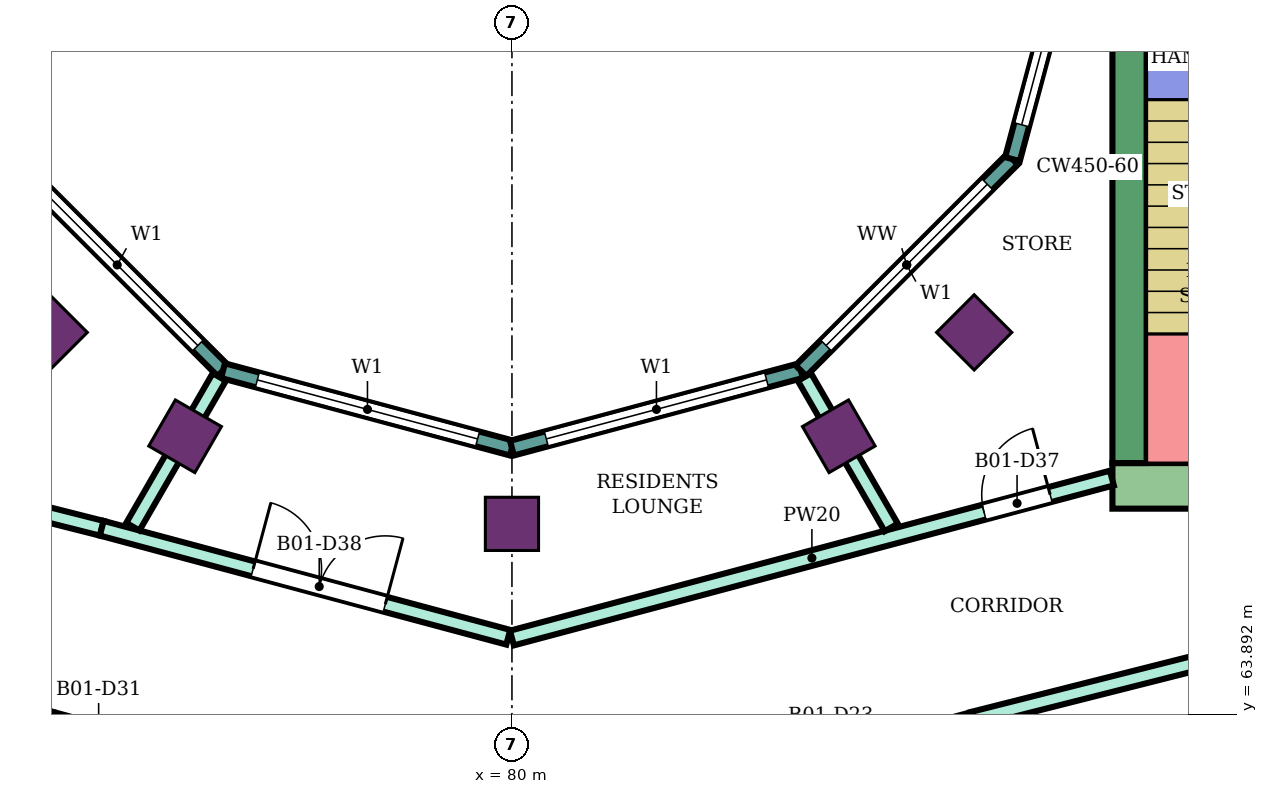
"""IFC4 building model, lengths in metres.
Left out: names, types, materials, properties, quantities, classifications, styles, units other than length and angle.
Written with IfcOpenShell. Run it as: python <this file> out.ifc"""

import sys

from ifc_helpers import new_model, si_unit, direction, frame, frame_2d, origin, origin_2d, place, context, subcontext, project, spatial, rectangle, extrude, element, fill, save


model = new_model("IFC4")
c1 = context("Model", 3, precision=1e-05, world=origin(), true_north=direction((0.0, 1.0)))
c2 = subcontext(c1, "Body", "Model", "MODEL_VIEW")
j1 = project(units=[si_unit("LENGTHUNIT", "METRE"), si_unit("PLANEANGLEUNIT", "RADIAN")], contexts=[c1])
p1 = place(None, origin())
s1 = spatial("IfcSite", under=j1, at=p1, CompositionType="ELEMENT")
p2 = place(p1, origin())
s2 = spatial("IfcBuilding", under=s1, at=p2, CompositionType="ELEMENT")
p3 = place(p2, frame((0.0, 0.0, 216.7)))
s3 = spatial("IfcBuildingStorey", under=s2, at=p3, CompositionType="ELEMENT", Elevation=216.7)
for number, where, z_axis, x_axis in (
    (1, (73.919, 68.919, 0.0), (0.0, 0.0, 1.0), (-0.707, -0.707, 0.0)),
    (2, (75.7, 67.552, 0.0), (0.0, 0.0, 1.0), (-0.5, -0.866, 0.0)),
    (3, (80.0, 66.4, 0.0), (0.0, 0.0, 1.0), (0.0, -1.0, 0.0)),
    (4, (84.3, 67.552, 0.0), (0.0, 0.0, 1.0), (0.5, -0.866, 0.0)),
    (5, (86.081, 68.919, 0.0), (0.0, 0.0, 1.0), (0.707, -0.707, 0.0)),
):
    element("IfcColumn", number, at=place(p3, frame(where, z_axis=z_axis, x_axis=x_axis)), inside=s3, PredefinedType="COLUMN", context=c2, shape_type="SweptSolid", body=[
        extrude(rectangle(XDim=0.7, YDim=0.7, at=origin_2d()), origin(), (0.0, 0.0, 1.0), 4.2),
    ])
p4 = place(p3, frame((87.9, 66.9, 0.0), z_axis=(0.0, 0.0, 1.0), x_axis=(1.0, 0.0, 0.0)))
e6 = element("IfcWall", 6, at=p4, inside=s3, PredefinedType="SHEAR", context=c2, shape_type="SweptSolid", body=[
    extrude(rectangle(XDim=14.9, YDim=0.6, at=frame_2d((7.45, 0.0))), origin(), (0.0, 0.0, 1.0), 3.88),
])
p5 = place(p4, frame((4.2, 0.0, 0.0)))
e7 = element("IfcOpeningElement", 7, at=p5, cuts=e6, PredefinedType="OPENING", context=c2, shape_type="SweptSolid", body=[
    extrude(rectangle(XDim=2.4, YDim=2.4, at=frame_2d((1.2, 1.2))), frame((0.0, 0.31, 0.0), z_axis=(0.0, -1.0, 0.0), x_axis=(1.0, 0.0, 0.0)), (0.0, 0.0, 1.0), 0.62),
])
p6 = place(p3, frame((88.125, 67.2, 0.0), z_axis=(0.0, 0.0, 1.0), x_axis=(0.0, 1.0, 0.0)))
e8 = element("IfcWall", 8, at=p6, inside=s3, PredefinedType="SHEAR", context=c2, shape_type="SweptSolid", body=[
    extrude(rectangle(XDim=7.8, YDim=0.45, at=frame_2d((3.9, 0.0))), origin(), (0.0, 0.0, 1.0), 3.88),
])
p7 = place(p3, frame((73.415, 71.198, 0.0), z_axis=(0.0, 0.0, 1.0), x_axis=(0.707106781187, -0.707106781187, 0.0)))
e9 = element("IfcWall", 9, at=p7, inside=s3, PredefinedType="NOTDEFINED", context=c2, shape_type="SweptSolid", body=[
    extrude(rectangle(XDim=3.936, YDim=0.2, at=frame_2d((1.968, 0.0))), origin(), (0.0, 0.0, 1.0), 4.2),
])
p8 = place(p7, frame((0.468, 0.0, 0.9)))
e10 = element("IfcOpeningElement", 10, at=p8, cuts=e9, PredefinedType="OPENING", context=c2, shape_type="SweptSolid", body=[
    extrude(rectangle(XDim=3.0, YDim=2.3, at=frame_2d((1.5, 1.15))), frame((0.0, 0.11, 0.0), z_axis=(0.0, -1.0, 0.0), x_axis=(1.0, 0.0, 0.0)), (0.0, 0.0, 1.0), 0.22),
])
p9 = place(p3, frame((76.198, 68.415, 0.0), z_axis=(0.0, 0.0, 1.0), x_axis=(0.965933654434, -0.258789828301, 0.0)))
e11 = element("IfcWall", 11, at=p9, inside=s3, PredefinedType="NOTDEFINED", context=c2, shape_type="SweptSolid", body=[
    extrude(rectangle(XDim=3.936, YDim=0.2, at=frame_2d((1.968, 0.0))), origin(), (0.0, 0.0, 1.0), 4.2),
])
p10 = place(p9, frame((0.468, 0.0, 0.9)))
e12 = element("IfcOpeningElement", 12, at=p10, cuts=e11, PredefinedType="OPENING", context=c2, shape_type="SweptSolid", body=[
    extrude(rectangle(XDim=3.0, YDim=2.3, at=frame_2d((1.5, 1.15))), frame((0.0, 0.11, 0.0), z_axis=(0.0, -1.0, 0.0), x_axis=(1.0, 0.0, 0.0)), (0.0, 0.0, 1.0), 0.22),
])
p11 = place(p3, frame((80.0, 67.396, 0.0), z_axis=(0.0, 0.0, 1.0), x_axis=(0.965933654434, 0.258789828301, 0.0)))
e13 = element("IfcWall", 13, at=p11, inside=s3, PredefinedType="NOTDEFINED", context=c2, shape_type="SweptSolid", body=[
    extrude(rectangle(XDim=3.936, YDim=0.2, at=frame_2d((1.968, 0.0))), origin(), (0.0, 0.0, 1.0), 4.2),
])
p12 = place(p11, frame((0.468, 0.0, 0.9)))
e14 = element("IfcOpeningElement", 14, at=p12, cuts=e13, PredefinedType="OPENING", context=c2, shape_type="SweptSolid", body=[
    extrude(rectangle(XDim=3.0, YDim=2.3, at=frame_2d((1.5, 1.15))), frame((0.0, 0.11, 0.0), z_axis=(0.0, -1.0, 0.0), x_axis=(1.0, 0.0, 0.0)), (0.0, 0.0, 1.0), 0.22),
])
p13 = place(p3, frame((83.802, 68.415, 0.0), z_axis=(0.0, 0.0, 1.0), x_axis=(0.707106781187, 0.707106781187, 0.0)))
e15 = element("IfcWall", 15, at=p13, inside=s3, PredefinedType="NOTDEFINED", context=c2, shape_type="SweptSolid", body=[
    extrude(rectangle(XDim=3.936, YDim=0.2, at=frame_2d((1.968, 0.0))), origin(), (0.0, 0.0, 1.0), 4.2),
])
p14 = place(p13, frame((0.468, 0.0, 0.9)))
e16 = element("IfcOpeningElement", 16, at=p14, cuts=e15, PredefinedType="OPENING", context=c2, shape_type="SweptSolid", body=[
    extrude(rectangle(XDim=3.0, YDim=2.3, at=frame_2d((1.5, 1.15))), frame((0.0, 0.11, 0.0), z_axis=(0.0, -1.0, 0.0), x_axis=(1.0, 0.0, 0.0)), (0.0, 0.0, 1.0), 0.22),
])
p15 = place(p3, frame((86.585, 71.198, 0.0), z_axis=(0.0, 0.0, 1.0), x_axis=(0.258789828301, 0.965933654434, 0.0)))
e17 = element("IfcWall", 17, at=p15, inside=s3, PredefinedType="NOTDEFINED", context=c2, shape_type="SweptSolid", body=[
    extrude(rectangle(XDim=3.936, YDim=0.2, at=frame_2d((1.968, 0.0))), origin(), (0.0, 0.0, 1.0), 4.2),
])
p16 = place(p15, frame((0.468, 0.0, 0.9)))
e18 = element("IfcOpeningElement", 18, at=p16, cuts=e17, PredefinedType="OPENING", context=c2, shape_type="SweptSolid", body=[
    extrude(rectangle(XDim=3.0, YDim=2.3, at=frame_2d((1.5, 1.15))), frame((0.0, 0.11, 0.0), z_axis=(0.0, -1.0, 0.0), x_axis=(1.0, 0.0, 0.0)), (0.0, 0.0, 1.0), 0.22),
])
p17 = place(p3, frame((69.86, 64.86, 0.0), z_axis=(0.0, 0.0, 1.0), x_axis=(0.96942980222, -0.245368821506, 0.0)))
e19 = element("IfcWall", 19, at=p17, inside=s3, PredefinedType="PARTITIONING", context=c2, shape_type="SweptSolid", body=[
    extrude(rectangle(XDim=4.216, YDim=0.2, at=frame_2d((2.108, 0.0))), origin(), (0.0, 0.0, 1.0), 3.75),
])
p18 = place(p17, frame((2.331, 0.0, 0.0)))
e20 = element("IfcOpeningElement", 20, at=p18, cuts=e19, PredefinedType="OPENING", context=c2, shape_type="SweptSolid", body=[
    extrude(rectangle(XDim=1.0, YDim=2.1, at=frame_2d((0.5, 1.05))), frame((0.0, 0.11, 0.0), z_axis=(0.0, -1.0, 0.0), x_axis=(1.0, 0.0, 0.0)), (0.0, 0.0, 1.0), 0.22),
])
p19 = place(p3, frame((72.1, 66.975, 0.0), z_axis=(0.0, 0.0, 1.0), x_axis=(0.969471314457, -0.245204752086, 0.0)))
e21 = element("IfcWall", 21, at=p19, inside=s3, PredefinedType="PARTITIONING", context=c2, shape_type="SweptSolid", body=[
    extrude(rectangle(XDim=2.582, YDim=0.2, at=frame_2d((1.291, 0.0))), origin(), (0.0, 0.0, 1.0), 3.75),
])
p20 = place(p19, frame((0.841, 0.0, 0.0)))
e22 = element("IfcOpeningElement", 22, at=p20, cuts=e21, PredefinedType="OPENING", context=c2, shape_type="SweptSolid", body=[
    extrude(rectangle(XDim=0.9, YDim=2.1, at=frame_2d((0.45, 1.05))), frame((0.0, 0.11, 0.0), z_axis=(0.0, -1.0, 0.0), x_axis=(1.0, 0.0, 0.0)), (0.0, 0.0, 1.0), 0.22),
])
p21 = place(p3, frame((73.947, 63.826, 0.0), z_axis=(0.0, 0.0, 1.0), x_axis=(0.965876152316, -0.259004359784, 0.0)))
e23 = element("IfcWall", 23, at=p21, inside=s3, PredefinedType="PARTITIONING", context=c2, shape_type="SweptSolid", body=[
    extrude(rectangle(XDim=6.217, YDim=0.2, at=frame_2d((3.108, 0.0))), origin(), (0.0, 0.0, 1.0), 3.75),
])
p22 = place(p21, frame((0.137, 0.0, 0.0)))
e24 = element("IfcOpeningElement", 24, at=p22, cuts=e23, PredefinedType="OPENING", context=c2, shape_type="SweptSolid", body=[
    extrude(rectangle(XDim=1.0, YDim=2.1, at=frame_2d((0.5, 1.05))), frame((0.0, 0.11, 0.0), z_axis=(0.0, -1.0, 0.0), x_axis=(1.0, 0.0, 0.0)), (0.0, 0.0, 1.0), 0.22),
])
p23 = place(p3, frame((74.603, 66.342, 0.0), z_axis=(0.0, 0.0, 1.0), x_axis=(0.965895298152, -0.258932950796, 0.0)))
e25 = element("IfcWall", 25, at=p23, inside=s3, PredefinedType="PARTITIONING", context=c2, shape_type="SweptSolid", body=[
    extrude(rectangle(XDim=5.538, YDim=0.2, at=frame_2d((2.769, 0.0))), origin(), (0.0, 0.0, 1.0), 3.75),
])
p24 = place(p23, frame((2.062, 0.0, 0.0)))
e26 = element("IfcOpeningElement", 26, at=p24, cuts=e25, PredefinedType="OPENING", context=c2, shape_type="SweptSolid", body=[
    extrude(rectangle(XDim=1.8, YDim=2.1, at=frame_2d((0.9, 1.05))), frame((0.0, 0.11, 0.0), z_axis=(0.0, -1.0, 0.0), x_axis=(1.0, 0.0, 0.0)), (0.0, 0.0, 1.0), 0.22),
])
p25 = place(p3, frame((75.013, 66.363, 0.0), z_axis=(0.0, 0.0, 1.0), x_axis=(0.500121996664, 0.86595495752, 0.0)))
e27 = element("IfcWall", 27, at=p25, inside=s3, PredefinedType="PARTITIONING", context=c2, shape_type="SweptSolid", body=[
    extrude(rectangle(XDim=2.274, YDim=0.2, at=frame_2d((1.137, 0.0))), origin(), (0.0, 0.0, 1.0), 3.75),
])
p26 = place(p3, frame((80.0, 64.898, 0.0), z_axis=(0.0, 0.0, 1.0), x_axis=(0.966237419782, 0.257653349704, 0.0)))
e28 = element("IfcWall", 28, at=p26, inside=s3, PredefinedType="PARTITIONING", context=c2, shape_type="SweptSolid", body=[
    extrude(rectangle(XDim=8.169, YDim=0.2, at=frame_2d((4.084, 0.0))), origin(), (0.0, 0.0, 1.0), 3.75),
])
p27 = place(p26, frame((6.428, 0.0, 0.0)))
e29 = element("IfcOpeningElement", 29, at=p27, cuts=e28, PredefinedType="OPENING", context=c2, shape_type="SweptSolid", body=[
    extrude(rectangle(XDim=0.9, YDim=2.1, at=frame_2d((0.45, 1.05))), frame((0.0, 0.11, 0.0), z_axis=(0.0, -1.0, 0.0), x_axis=(1.0, 0.0, 0.0)), (0.0, 0.0, 1.0), 0.22),
])
p28 = place(p3, frame((80.048, 62.217, 0.0), z_axis=(0.0, 0.0, 1.0), x_axis=(0.966097920642, 0.258175923996, 0.0)))
e30 = element("IfcWall", 30, at=p28, inside=s3, PredefinedType="PARTITIONING", context=c2, shape_type="SweptSolid", body=[
    extrude(rectangle(XDim=6.217, YDim=0.2, at=frame_2d((3.108, 0.0))), origin(), (0.0, 0.0, 1.0), 3.75),
])
p29 = place(p28, frame((3.792, 0.0, 0.0)))
e31 = element("IfcOpeningElement", 31, at=p29, cuts=e30, PredefinedType="OPENING", context=c2, shape_type="SweptSolid", body=[
    extrude(rectangle(XDim=1.0, YDim=2.1, at=frame_2d((0.5, 1.05))), frame((0.0, 0.11, 0.0), z_axis=(0.0, -1.0, 0.0), x_axis=(1.0, 0.0, 0.0)), (0.0, 0.0, 1.0), 0.22),
])
p30 = place(p3, frame((83.848, 68.331, 0.0), z_axis=(0.0, 0.0, 1.0), x_axis=(0.499851978358, -0.866110847255, 0.0)))
e32 = element("IfcWall", 32, at=p30, inside=s3, PredefinedType="PARTITIONING", context=c2, shape_type="SweptSolid", body=[
    extrude(rectangle(XDim=2.284, YDim=0.2, at=frame_2d((1.142, 0.0))), origin(), (0.0, 0.0, 1.0), 3.75),
])
p31 = place(p3, frame((86.053, 63.826, 0.0), z_axis=(0.0, 0.0, 1.0), x_axis=(0.969490004987, 0.245130843083, 0.0)))
e33 = element("IfcWall", 33, at=p31, inside=s3, PredefinedType="PARTITIONING", context=c2, shape_type="SweptSolid", body=[
    extrude(rectangle(XDim=5.908, YDim=0.2, at=frame_2d((2.954, 0.0))), origin(), (0.0, 0.0, 1.0), 3.75),
])
p32 = place(p8, origin())
e34 = element("IfcWindow", 34, at=p32, inside=s3, PartitioningType="SINGLE_PANEL", PredefinedType="WINDOW", context=c2, shape_type="SweptSolid", body=[
    extrude(rectangle(XDim=3.0, YDim=2.3, at=frame_2d((1.5, 1.15))), frame((0.0, 0.03, 0.0), z_axis=(0.0, -1.0, 0.0), x_axis=(1.0, 0.0, 0.0)), (0.0, 0.0, 1.0), 0.06),
])
fill(e10, e34)
p33 = place(p10, origin())
e35 = element("IfcWindow", 35, at=p33, inside=s3, PartitioningType="SINGLE_PANEL", PredefinedType="WINDOW", context=c2, shape_type="SweptSolid", body=[
    extrude(rectangle(XDim=3.0, YDim=2.3, at=frame_2d((1.5, 1.15))), frame((0.0, 0.03, 0.0), z_axis=(0.0, -1.0, 0.0), x_axis=(1.0, 0.0, 0.0)), (0.0, 0.0, 1.0), 0.06),
])
fill(e12, e35)
p34 = place(p12, origin())
e36 = element("IfcWindow", 36, at=p34, inside=s3, PartitioningType="SINGLE_PANEL", PredefinedType="WINDOW", context=c2, shape_type="SweptSolid", body=[
    extrude(rectangle(XDim=3.0, YDim=2.3, at=frame_2d((1.5, 1.15))), frame((0.0, 0.03, 0.0), z_axis=(0.0, -1.0, 0.0), x_axis=(1.0, 0.0, 0.0)), (0.0, 0.0, 1.0), 0.06),
])
fill(e14, e36)
p35 = place(p14, origin())
e37 = element("IfcWindow", 37, at=p35, inside=s3, PartitioningType="SINGLE_PANEL", PredefinedType="WINDOW", context=c2, shape_type="SweptSolid", body=[
    extrude(rectangle(XDim=3.0, YDim=2.3, at=frame_2d((1.5, 1.15))), frame((0.0, 0.03, 0.0), z_axis=(0.0, -1.0, 0.0), x_axis=(1.0, 0.0, 0.0)), (0.0, 0.0, 1.0), 0.06),
])
fill(e16, e37)
p36 = place(p16, origin())
e38 = element("IfcWindow", 38, at=p36, inside=s3, PartitioningType="SINGLE_PANEL", PredefinedType="WINDOW", context=c2, shape_type="SweptSolid", body=[
    extrude(rectangle(XDim=3.0, YDim=2.3, at=frame_2d((1.5, 1.15))), frame((0.0, 0.03, 0.0), z_axis=(0.0, -1.0, 0.0), x_axis=(1.0, 0.0, 0.0)), (0.0, 0.0, 1.0), 0.06),
])
fill(e18, e38)
p37 = place(p27, origin())
e39 = element("IfcDoor", 39, at=p37, inside=s3, OperationType="SINGLE_SWING_RIGHT", PredefinedType="DOOR", context=c2, shape_type="SweptSolid", body=[
    extrude(rectangle(XDim=0.9, YDim=2.1, at=frame_2d((0.45, 1.05))), frame((0.0, 0.025, 0.0), z_axis=(0.0, -1.0, 0.0), x_axis=(1.0, 0.0, 0.0)), (0.0, 0.0, 1.0), 0.05),
])
fill(e29, e39)
p38 = place(p24, origin())
e40 = element("IfcDoor", 40, at=p38, inside=s3, OperationType="DOUBLE_DOOR_SINGLE_SWING", PredefinedType="DOOR", context=c2, shape_type="SweptSolid", body=[
    extrude(rectangle(XDim=1.8, YDim=2.1, at=frame_2d((0.9, 1.05))), frame((0.0, 0.025, 0.0), z_axis=(0.0, -1.0, 0.0), x_axis=(1.0, 0.0, 0.0)), (0.0, 0.0, 1.0), 0.05),
])
fill(e26, e40)
save(model, sys.argv[1])
